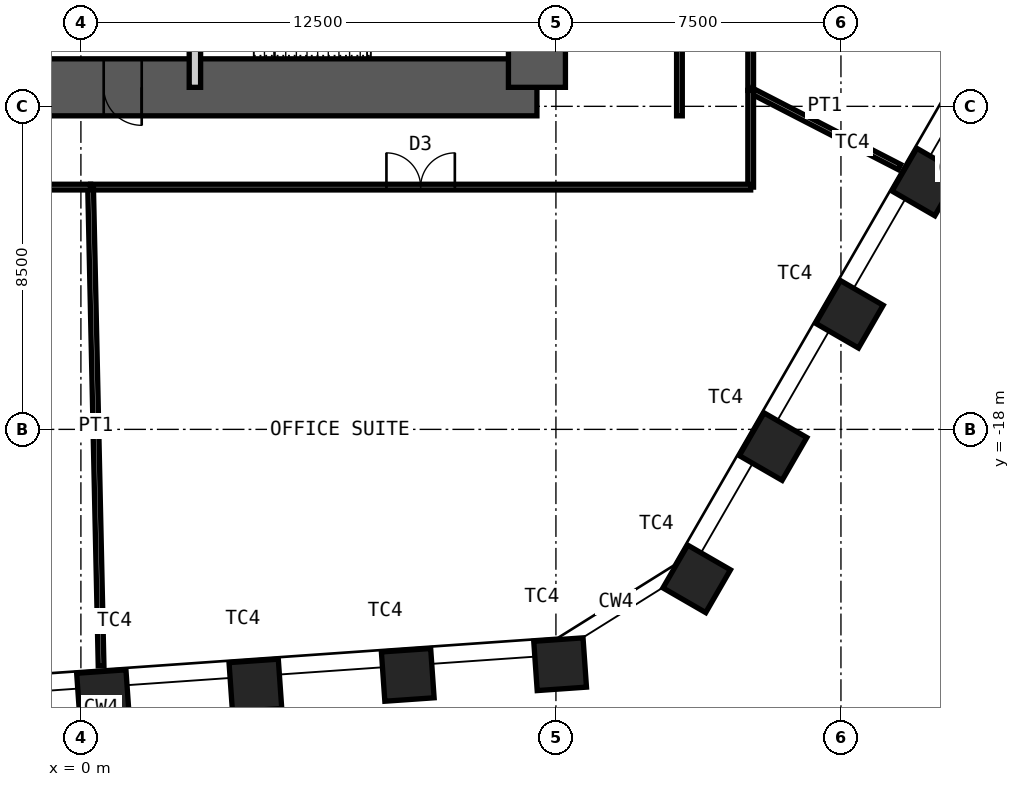
"""IFC4 building model, lengths in metres.
Left out: names, types, materials, properties, quantities, classifications, styles, units other than length and angle.
Written with IfcOpenShell. Run it as: python <this file> out.ifc"""

import sys

from ifc_helpers import new_model, si_unit, direction, frame, frame_2d, origin, origin_2d, place, context, subcontext, project, spatial, rectangle, hollow_rectangle, extrude, element, fill, save


model = new_model("IFC4")
c1 = context("Model", 3, precision=1e-05, world=origin(), true_north=direction((0.0, 1.0)))
c2 = subcontext(c1, "Body", "Model", "MODEL_VIEW")
j1 = project(units=[si_unit("LENGTHUNIT", "METRE"), si_unit("PLANEANGLEUNIT", "RADIAN")], contexts=[c1])
p1 = place(None, origin())
s1 = spatial("IfcSite", under=j1, at=p1, CompositionType="ELEMENT")
p2 = place(p1, origin())
s2 = spatial("IfcBuilding", under=s1, at=p2, CompositionType="ELEMENT")
p3 = place(p2, frame((0.0, 0.0, 145.0)))
s3 = spatial("IfcBuildingStorey", under=s2, at=p3, CompositionType="ELEMENT", Elevation=145.0)
for number, where, z_axis, x_axis in (
    (1, (22.233, -11.491, 0.0), (0.0, 0.0, 1.0), (0.5, 0.866, 0.0)),
    (2, (20.223, -14.972, 0.0), (0.0, 0.0, 1.0), (0.5, 0.866, 0.0)),
    (3, (18.214, -18.453, 0.0), (0.0, 0.0, 1.0), (0.5, 0.866, 0.0)),
    (4, (16.204, -21.933, 0.0), (0.0, 0.0, 1.0), (0.5, 0.866, 0.0)),
    (5, (12.61, -24.179, 0.0), (0.0, 0.0, 1.0), (0.998, 0.07, 0.0)),
    (6, (8.601, -24.46, 0.0), (0.0, 0.0, 1.0), (0.998, 0.07, 0.0)),
    (7, (4.592, -24.74, 0.0), (0.0, 0.0, 1.0), (0.998, 0.07, 0.0)),
    (8, (0.582, -25.02, 0.0), (0.0, 0.0, 1.0), (0.998, 0.07, 0.0)),
):
    element("IfcColumn", number, at=place(p3, frame(where, z_axis=z_axis, x_axis=x_axis)), inside=s3, PredefinedType="COLUMN", context=c2, shape_type="SweptSolid", body=[
        extrude(hollow_rectangle(XDim=1.3, YDim=1.3, WallThickness=0.1, at=origin_2d()), origin(), (0.0, 0.0, 1.0), 4.2),
    ])
p4 = place(p3, frame((-12.0, -9.0, 0.0), z_axis=(0.0, 0.0, 1.0), x_axis=(1.0, 0.0, 0.0)))
e9 = element("IfcWall", 9, at=p4, inside=s3, PredefinedType="SHEAR", context=c2, shape_type="SweptSolid", body=[
    extrude(rectangle(XDim=24.0, YDim=1.5, at=frame_2d((12.0, 0.0))), origin(), (0.0, 0.0, 1.0), 4.2),
])
p5 = place(p4, frame((1.35, 0.0, 0.0)))
e10 = element("IfcOpeningElement", 10, at=p5, cuts=e9, PredefinedType="OPENING", context=c2, shape_type="SweptSolid", body=[
    extrude(rectangle(XDim=1.0, YDim=2.1, at=frame_2d((0.5, 1.05))), frame((0.0, 0.76, 0.0), z_axis=(0.0, -1.0, 0.0), x_axis=(1.0, 0.0, 0.0)), (0.0, 0.0, 1.0), 1.52),
])
p6 = place(p4, frame((5.325, 0.0, 0.0)))
e11 = element("IfcOpeningElement", 11, at=p6, cuts=e9, PredefinedType="OPENING", context=c2, shape_type="SweptSolid", body=[
    extrude(rectangle(XDim=1.15, YDim=2.1, at=frame_2d((0.575, 1.05))), frame((0.0, 0.76, 0.0), z_axis=(0.0, -1.0, 0.0), x_axis=(1.0, 0.0, 0.0)), (0.0, 0.0, 1.0), 1.52),
])
p7 = place(p4, frame((12.6, 0.0, 0.0)))
e12 = element("IfcOpeningElement", 12, at=p7, cuts=e9, PredefinedType="OPENING", context=c2, shape_type="SweptSolid", body=[
    extrude(rectangle(XDim=1.0, YDim=2.1, at=frame_2d((0.5, 1.05))), frame((0.0, 0.76, 0.0), z_axis=(0.0, -1.0, 0.0), x_axis=(1.0, 0.0, 0.0)), (0.0, 0.0, 1.0), 1.52),
])
p8 = place(p3, frame((12.0, -9.0, 0.0), z_axis=(0.0, 0.0, 1.0), x_axis=(0.0, 1.0, 0.0)))
e13 = element("IfcWall", 13, at=p8, inside=s3, PredefinedType="SHEAR", context=c2, shape_type="SweptSolid", body=[
    extrude(rectangle(XDim=18.0, YDim=1.5, at=frame_2d((9.0, 0.0))), origin(), (0.0, 0.0, 1.0), 4.2),
])
p9 = place(p8, frame((8.1, 0.0, 0.0)))
e14 = element("IfcOpeningElement", 14, at=p9, cuts=e13, PredefinedType="OPENING", context=c2, shape_type="SweptSolid", body=[
    extrude(rectangle(XDim=1.8, YDim=2.1, at=frame_2d((0.9, 1.05))), frame((0.0, 0.76, 0.0), z_axis=(0.0, -1.0, 0.0), x_axis=(1.0, 0.0, 0.0)), (0.0, 0.0, 1.0), 1.52),
])
p10 = place(p3, frame((3.0, -9.0, 0.0), z_axis=(0.0, 0.0, 1.0), x_axis=(0.0, 1.0, 0.0)))
e15 = element("IfcWall", 15, at=p10, inside=s3, PredefinedType="PARTITIONING", context=c2, shape_type="SweptSolid", body=[
    extrude(rectangle(XDim=3.85, YDim=0.3, at=frame_2d((1.925, 0.0))), origin(), (0.0, 0.0, 1.0), 3.98),
])
p11 = place(p10, frame((1.425, 0.0, 0.0)))
e16 = element("IfcOpeningElement", 16, at=p11, cuts=e15, PredefinedType="OPENING", context=c2, shape_type="SweptSolid", body=[
    extrude(rectangle(XDim=1.0, YDim=2.1, at=frame_2d((0.5, 1.05))), frame((0.0, 0.16, 0.0), z_axis=(0.0, -1.0, 0.0), x_axis=(1.0, 0.0, 0.0)), (0.0, 0.0, 1.0), 0.32),
])
p12 = place(p3, frame((17.625, 10.698, 0.0), z_axis=(0.0, 0.0, 1.0), x_axis=(0.0, -1.0, 0.0)))
e17 = element("IfcWall", 17, at=p12, inside=s3, PredefinedType="PARTITIONING", context=c2, shape_type="SweptSolid", body=[
    extrude(rectangle(XDim=19.778, YDim=0.15, at=frame_2d((9.889, 0.0))), origin(), (0.0, 0.0, 1.0), 4.03),
])
p13 = place(p12, frame((8.989, 0.0, 0.0)))
e18 = element("IfcOpeningElement", 18, at=p13, cuts=e17, PredefinedType="OPENING", context=c2, shape_type="SweptSolid", body=[
    extrude(rectangle(XDim=1.8, YDim=2.4, at=frame_2d((0.9, 1.2))), frame((0.0, 0.085, 0.0), z_axis=(0.0, -1.0, 0.0), x_axis=(1.0, 0.0, 0.0)), (0.0, 0.0, 1.0), 0.17),
])
p14 = place(p3, frame((21.538, -11.096, 0.0), z_axis=(0.0, 0.0, 1.0), x_axis=(-0.888982083501, 0.457941977999, 0.0)))
e19 = element("IfcWall", 19, at=p14, inside=s3, PredefinedType="PARTITIONING", context=c2, shape_type="SweptSolid", body=[
    extrude(rectangle(XDim=4.401, YDim=0.15, at=frame_2d((2.201, 0.0))), origin(), (0.0, 0.0, 1.0), 3.33),
])
p15 = place(p3, frame((17.625, -9.08, 0.0), z_axis=(0.0, 0.0, 1.0), x_axis=(0.0, -1.0, 0.0)))
e20 = element("IfcWall", 20, at=p15, inside=s3, PredefinedType="PARTITIONING", context=c2, shape_type="SweptSolid", body=[
    extrude(rectangle(XDim=2.545, YDim=0.15, at=frame_2d((1.272, 0.0))), origin(), (0.0, 0.0, 1.0), 4.03),
])
p16 = place(p3, frame((17.625, -11.625, 0.0), z_axis=(0.0, 0.0, 1.0), x_axis=(-1.0, 0.0, 0.0)))
e21 = element("IfcWall", 21, at=p16, inside=s3, PredefinedType="PARTITIONING", context=c2, shape_type="SweptSolid", body=[
    extrude(rectangle(XDim=17.37, YDim=0.15, at=frame_2d((8.685, 0.0))), origin(), (0.0, 0.0, 1.0), 4.03),
])
p17 = place(p16, frame((7.785, 0.0, 0.0)))
e22 = element("IfcOpeningElement", 22, at=p17, cuts=e21, PredefinedType="OPENING", context=c2, shape_type="SweptSolid", body=[
    extrude(rectangle(XDim=1.8, YDim=2.4, at=frame_2d((0.9, 1.2))), frame((0.0, 0.085, 0.0), z_axis=(0.0, -1.0, 0.0), x_axis=(1.0, 0.0, 0.0)), (0.0, 0.0, 1.0), 0.17),
])
p18 = place(p3, frame((0.531, -24.222, 0.0), z_axis=(0.0, 0.0, 1.0), x_axis=(-0.021933557026, 0.999759430601, 0.0)))
e23 = element("IfcWall", 23, at=p18, inside=s3, PredefinedType="PARTITIONING", context=c2, shape_type="SweptSolid", body=[
    extrude(rectangle(XDim=12.6, YDim=0.15, at=frame_2d((6.3, 0.0))), origin(), (0.0, 0.0, 1.0), 3.33),
])
p19 = place(p3, frame((0.255, -11.625, 0.0), z_axis=(0.0, 0.0, 1.0), x_axis=(-1.0, 0.0, 0.0)))
e24 = element("IfcWall", 24, at=p19, inside=s3, PredefinedType="PARTITIONING", context=c2, shape_type="SweptSolid", body=[
    extrude(rectangle(XDim=18.332, YDim=0.15, at=frame_2d((9.166, 0.0))), origin(), (0.0, 0.0, 1.0), 4.03),
])
p20 = place(p19, frame((8.266, 0.0, 0.0)))
e25 = element("IfcOpeningElement", 25, at=p20, cuts=e24, PredefinedType="OPENING", context=c2, shape_type="SweptSolid", body=[
    extrude(rectangle(XDim=1.8, YDim=2.4, at=frame_2d((0.9, 1.2))), frame((0.0, 0.085, 0.0), z_axis=(0.0, -1.0, 0.0), x_axis=(1.0, 0.0, 0.0)), (0.0, 0.0, 1.0), 0.17),
])
p21 = place(p3, frame((15.75, -9.75, 0.0), z_axis=(0.0, 0.0, 1.0), x_axis=(0.0, 1.0, 0.0)))
e26 = element("IfcWall", 26, at=p21, inside=s3, PredefinedType="PARTITIONING", context=c2, shape_type="SweptSolid", body=[
    extrude(rectangle(XDim=7.25, YDim=0.15, at=frame_2d((3.625, 0.0))), origin(), (0.0, 0.0, 1.0), 4.03),
])
p22 = place(p7, origin())
e27 = element("IfcDoor", 27, at=p22, inside=s3, OperationType="SINGLE_SWING_RIGHT", PredefinedType="DOOR", context=c2, shape_type="SweptSolid", body=[
    extrude(rectangle(XDim=1.0, YDim=2.1, at=frame_2d((0.5, 1.05))), frame((0.0, 0.025, 0.0), z_axis=(0.0, -1.0, 0.0), x_axis=(1.0, 0.0, 0.0)), (0.0, 0.0, 1.0), 0.05),
])
fill(e12, e27)
p23 = place(p17, origin())
e28 = element("IfcDoor", 28, at=p23, inside=s3, OperationType="DOUBLE_DOOR_DOUBLE_SWING", PredefinedType="DOOR", context=c2, shape_type="SweptSolid", body=[
    extrude(rectangle(XDim=1.8, YDim=2.4, at=frame_2d((0.9, 1.2))), frame((0.0, 0.025, 0.0), z_axis=(0.0, -1.0, 0.0), x_axis=(1.0, 0.0, 0.0)), (0.0, 0.0, 1.0), 0.05),
])
fill(e22, e28)
save(model, sys.argv[1])
